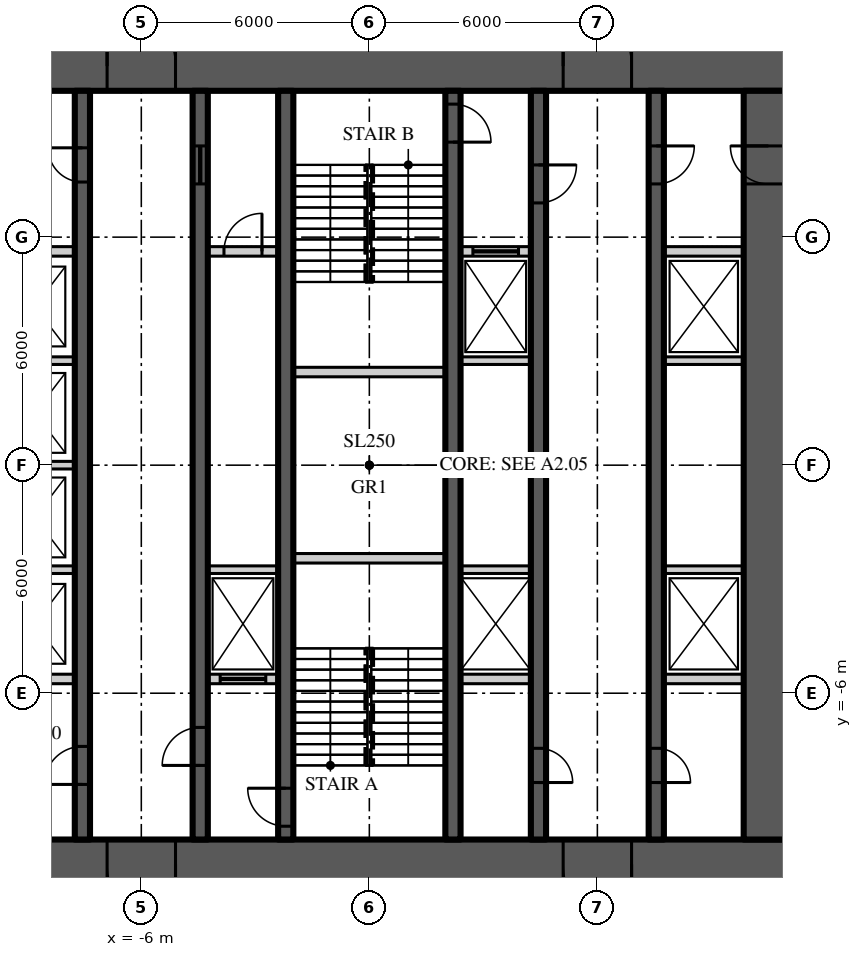
"""IFC4 building model, lengths in metres.
Left out: names, types, materials, properties, quantities, classifications, styles, units other than length and angle.
Written with IfcOpenShell. Run it as: python <this file> out.ifc"""

import sys

from ifc_helpers import new_model, si_unit, direction, frame, frame_2d, origin, place, context, subcontext, project, spatial, rectangle, extrude, element, fill, save


model = new_model("IFC4")
c1 = context("Model", 3, precision=1e-05, world=origin(), true_north=direction((0.0, 1.0)))
c2 = subcontext(c1, "Body", "Model", "MODEL_VIEW")
j1 = project(units=[si_unit("LENGTHUNIT", "METRE"), si_unit("PLANEANGLEUNIT", "RADIAN")], contexts=[c1])
p1 = place(None, origin())
s1 = spatial("IfcSite", under=j1, at=p1, CompositionType="ELEMENT")
p2 = place(p1, origin())
s2 = spatial("IfcBuilding", under=s1, at=p2, CompositionType="ELEMENT")
p3 = place(p2, frame((0.0, 0.0, 15.0)))
s3 = spatial("IfcBuildingStorey", under=s2, at=p3, CompositionType="ELEMENT", Elevation=15.0)
p4 = place(p3, frame((-11.15, 10.5, 0.0), z_axis=(0.0, 0.0, 1.0), x_axis=(1.0, 0.0, 0.0)))
e1 = element("IfcWall", 1, at=p4, inside=s3, PredefinedType="SHEAR", context=c2, shape_type="SweptSolid", body=[
    extrude(rectangle(XDim=22.3, YDim=1.3, at=frame_2d((11.15, 0.0))), origin(), (0.0, 0.0, 1.0), 8.0),
])
p5 = place(p4, frame((4.25, 0.0, 0.0)))
e2 = element("IfcOpeningElement", 2, at=p5, cuts=e1, PredefinedType="OPENING", context=c2, shape_type="SweptSolid", body=[
    extrude(rectangle(XDim=1.8, YDim=2.2, at=frame_2d((0.9, 1.1))), frame((0.0, 0.66, 0.0), z_axis=(0.0, -1.0, 0.0), x_axis=(1.0, 0.0, 0.0)), (0.0, 0.0, 1.0), 1.32),
])
p6 = place(p4, frame((16.25, 0.0, 0.0)))
e3 = element("IfcOpeningElement", 3, at=p6, cuts=e1, PredefinedType="OPENING", context=c2, shape_type="SweptSolid", body=[
    extrude(rectangle(XDim=1.8, YDim=2.2, at=frame_2d((0.9, 1.1))), frame((0.0, 0.66, 0.0), z_axis=(0.0, -1.0, 0.0), x_axis=(1.0, 0.0, 0.0)), (0.0, 0.0, 1.0), 1.32),
])
p7 = place(p3, frame((11.15, -10.5, 0.0), z_axis=(0.0, 0.0, 1.0), x_axis=(-1.0, 0.0, 0.0)))
e4 = element("IfcWall", 4, at=p7, inside=s3, PredefinedType="SHEAR", context=c2, shape_type="SweptSolid", body=[
    extrude(rectangle(XDim=22.3, YDim=1.3, at=frame_2d((11.15, 0.0))), origin(), (0.0, 0.0, 1.0), 8.0),
])
p8 = place(p7, frame((16.25, 0.0, 0.0)))
e5 = element("IfcOpeningElement", 5, at=p8, cuts=e4, PredefinedType="OPENING", context=c2, shape_type="SweptSolid", body=[
    extrude(rectangle(XDim=1.8, YDim=2.2, at=frame_2d((0.9, 1.1))), frame((0.0, 0.66, 0.0), z_axis=(0.0, -1.0, 0.0), x_axis=(1.0, 0.0, 0.0)), (0.0, 0.0, 1.0), 1.32),
])
p9 = place(p7, frame((4.25, 0.0, 0.0)))
e6 = element("IfcOpeningElement", 6, at=p9, cuts=e4, PredefinedType="OPENING", context=c2, shape_type="SweptSolid", body=[
    extrude(rectangle(XDim=1.8, YDim=2.2, at=frame_2d((0.9, 1.1))), frame((0.0, 0.66, 0.0), z_axis=(0.0, -1.0, 0.0), x_axis=(1.0, 0.0, 0.0)), (0.0, 0.0, 1.0), 1.32),
])
p10 = place(p3, frame((10.5, -9.85, 0.0), z_axis=(0.0, 0.0, 1.0), x_axis=(0.0, 1.0, 0.0)))
e7 = element("IfcWall", 7, at=p10, inside=s3, PredefinedType="SHEAR", context=c2, shape_type="SweptSolid", body=[
    extrude(rectangle(XDim=19.7, YDim=1.3, at=frame_2d((9.85, 0.0))), origin(), (0.0, 0.0, 1.0), 8.0),
])
p11 = place(p10, frame((17.25, 0.0, 0.0)))
e8 = element("IfcOpeningElement", 8, at=p11, cuts=e7, PredefinedType="OPENING", context=c2, shape_type="SweptSolid", body=[
    extrude(rectangle(XDim=1.0, YDim=2.2, at=frame_2d((0.5, 1.1))), frame((0.0, 0.66, 0.0), z_axis=(0.0, -1.0, 0.0), x_axis=(1.0, 0.0, 0.0)), (0.0, 0.0, 1.0), 1.32),
])
p12 = place(p3, frame((-7.55, -9.85, 0.0), z_axis=(0.0, 0.0, 1.0), x_axis=(0.0, 1.0, 0.0)))
e9 = element("IfcWall", 9, at=p12, inside=s3, PredefinedType="SHEAR", context=c2, shape_type="SweptSolid", body=[
    extrude(rectangle(XDim=19.7, YDim=0.4, at=frame_2d((9.85, 0.0))), origin(), (0.0, 0.0, 1.0), 8.0),
])
p13 = place(p12, frame((1.45, 0.0, 0.0)))
e10 = element("IfcOpeningElement", 10, at=p13, cuts=e9, PredefinedType="OPENING", context=c2, shape_type="SweptSolid", body=[
    extrude(rectangle(XDim=1.0, YDim=2.2, at=frame_2d((0.5, 1.1))), frame((0.0, 0.21, 0.0), z_axis=(0.0, -1.0, 0.0), x_axis=(1.0, 0.0, 0.0)), (0.0, 0.0, 1.0), 0.42),
])
p14 = place(p12, frame((17.3, 0.0, 0.0)))
e11 = element("IfcOpeningElement", 11, at=p14, cuts=e9, PredefinedType="OPENING", context=c2, shape_type="SweptSolid", body=[
    extrude(rectangle(XDim=0.9, YDim=2.1, at=frame_2d((0.45, 1.05))), frame((0.0, 0.21, 0.0), z_axis=(0.0, -1.0, 0.0), x_axis=(1.0, 0.0, 0.0)), (0.0, 0.0, 1.0), 0.42),
])
p15 = place(p3, frame((7.55, 9.85, 0.0), z_axis=(0.0, 0.0, 1.0), x_axis=(0.0, -1.0, 0.0)))
e12 = element("IfcWall", 12, at=p15, inside=s3, PredefinedType="SHEAR", context=c2, shape_type="SweptSolid", body=[
    extrude(rectangle(XDim=19.7, YDim=0.4, at=frame_2d((9.85, 0.0))), origin(), (0.0, 0.0, 1.0), 8.0),
])
p16 = place(p15, frame((1.45, 0.0, 0.0)))
e13 = element("IfcOpeningElement", 13, at=p16, cuts=e12, PredefinedType="OPENING", context=c2, shape_type="SweptSolid", body=[
    extrude(rectangle(XDim=1.0, YDim=2.2, at=frame_2d((0.5, 1.1))), frame((0.0, 0.21, 0.0), z_axis=(0.0, -1.0, 0.0), x_axis=(1.0, 0.0, 0.0)), (0.0, 0.0, 1.0), 0.42),
])
p17 = place(p15, frame((17.3, 0.0, 0.0)))
e14 = element("IfcOpeningElement", 14, at=p17, cuts=e12, PredefinedType="OPENING", context=c2, shape_type="SweptSolid", body=[
    extrude(rectangle(XDim=0.9, YDim=2.1, at=frame_2d((0.45, 1.05))), frame((0.0, 0.21, 0.0), z_axis=(0.0, -1.0, 0.0), x_axis=(1.0, 0.0, 0.0)), (0.0, 0.0, 1.0), 0.42),
])
p18 = place(p3, frame((-4.45, -9.85, 0.0), z_axis=(0.0, 0.0, 1.0), x_axis=(0.0, 1.0, 0.0)))
e15 = element("IfcWall", 15, at=p18, inside=s3, PredefinedType="SHEAR", context=c2, shape_type="SweptSolid", body=[
    extrude(rectangle(XDim=19.7, YDim=0.4, at=frame_2d((9.85, 0.0))), origin(), (0.0, 0.0, 1.0), 8.0),
])
p19 = place(p18, frame((1.95, 0.0, 0.0)))
e16 = element("IfcOpeningElement", 16, at=p19, cuts=e15, PredefinedType="OPENING", context=c2, shape_type="SweptSolid", body=[
    extrude(rectangle(XDim=1.0, YDim=2.2, at=frame_2d((0.5, 1.1))), frame((0.0, 0.21, 0.0), z_axis=(0.0, -1.0, 0.0), x_axis=(1.0, 0.0, 0.0)), (0.0, 0.0, 1.0), 0.42),
])
p20 = place(p18, frame((17.25, 0.0, 0.0)))
e17 = element("IfcOpeningElement", 17, at=p20, cuts=e15, PredefinedType="OPENING", context=c2, shape_type="SweptSolid", body=[
    extrude(rectangle(XDim=1.0, YDim=2.1, at=frame_2d((0.5, 1.05))), frame((0.0, 0.21, 0.0), z_axis=(0.0, -1.0, 0.0), x_axis=(1.0, 0.0, 0.0)), (0.0, 0.0, 1.0), 0.42),
])
p21 = place(p3, frame((4.45, 9.85, 0.0), z_axis=(0.0, 0.0, 1.0), x_axis=(0.0, -1.0, 0.0)))
e18 = element("IfcWall", 18, at=p21, inside=s3, PredefinedType="SHEAR", context=c2, shape_type="SweptSolid", body=[
    extrude(rectangle(XDim=19.7, YDim=0.4, at=frame_2d((9.85, 0.0))), origin(), (0.0, 0.0, 1.0), 8.0),
])
p22 = place(p21, frame((1.95, 0.0, 0.0)))
e19 = element("IfcOpeningElement", 19, at=p22, cuts=e18, PredefinedType="OPENING", context=c2, shape_type="SweptSolid", body=[
    extrude(rectangle(XDim=1.0, YDim=2.2, at=frame_2d((0.5, 1.1))), frame((0.0, 0.21, 0.0), z_axis=(0.0, -1.0, 0.0), x_axis=(1.0, 0.0, 0.0)), (0.0, 0.0, 1.0), 0.42),
])
p23 = place(p21, frame((17.3, 0.0, 0.0)))
e20 = element("IfcOpeningElement", 20, at=p23, cuts=e18, PredefinedType="OPENING", context=c2, shape_type="SweptSolid", body=[
    extrude(rectangle(XDim=0.9, YDim=2.1, at=frame_2d((0.45, 1.05))), frame((0.0, 0.21, 0.0), z_axis=(0.0, -1.0, 0.0), x_axis=(1.0, 0.0, 0.0)), (0.0, 0.0, 1.0), 0.42),
])
p24 = place(p3, frame((-2.2, -9.85, 0.0), z_axis=(0.0, 0.0, 1.0), x_axis=(0.0, 1.0, 0.0)))
e21 = element("IfcWall", 21, at=p24, inside=s3, PredefinedType="SHEAR", context=c2, shape_type="SweptSolid", body=[
    extrude(rectangle(XDim=19.7, YDim=0.4, at=frame_2d((9.85, 0.0))), origin(), (0.0, 0.0, 1.0), 8.0),
])
p25 = place(p24, frame((0.35, 0.0, 0.0)))
e22 = element("IfcOpeningElement", 22, at=p25, cuts=e21, PredefinedType="OPENING", context=c2, shape_type="SweptSolid", body=[
    extrude(rectangle(XDim=1.0, YDim=2.2, at=frame_2d((0.5, 1.1))), frame((0.0, 0.21, 0.0), z_axis=(0.0, -1.0, 0.0), x_axis=(1.0, 0.0, 0.0)), (0.0, 0.0, 1.0), 0.42),
])
p26 = place(p3, frame((2.2, 9.85, 0.0), z_axis=(0.0, 0.0, 1.0), x_axis=(0.0, -1.0, 0.0)))
e23 = element("IfcWall", 23, at=p26, inside=s3, PredefinedType="SHEAR", context=c2, shape_type="SweptSolid", body=[
    extrude(rectangle(XDim=19.7, YDim=0.4, at=frame_2d((9.85, 0.0))), origin(), (0.0, 0.0, 1.0), 8.0),
])
p27 = place(p26, frame((0.35, 0.0, 0.0)))
e24 = element("IfcOpeningElement", 24, at=p27, cuts=e23, PredefinedType="OPENING", context=c2, shape_type="SweptSolid", body=[
    extrude(rectangle(XDim=1.0, YDim=2.2, at=frame_2d((0.5, 1.1))), frame((0.0, 0.21, 0.0), z_axis=(0.0, -1.0, 0.0), x_axis=(1.0, 0.0, 0.0)), (0.0, 0.0, 1.0), 0.42),
])
p28 = place(p3, frame((-9.85, 5.625, 0.0), z_axis=(0.0, 0.0, 1.0), x_axis=(1.0, 0.0, 0.0)))
e25 = element("IfcWall", 25, at=p28, inside=s3, PredefinedType="SOLIDWALL", context=c2, shape_type="SweptSolid", body=[
    extrude(rectangle(XDim=2.1, YDim=0.25, at=frame_2d((1.05, 0.0))), origin(), (0.0, 0.0, 1.0), 7.8),
])
p29 = place(p3, frame((-4.25, 5.625, 0.0), z_axis=(0.0, 0.0, 1.0), x_axis=(1.0, 0.0, 0.0)))
e26 = element("IfcWall", 26, at=p29, inside=s3, PredefinedType="SOLIDWALL", context=c2, shape_type="SweptSolid", body=[
    extrude(rectangle(XDim=1.85, YDim=0.25, at=frame_2d((0.925, 0.0))), origin(), (0.0, 0.0, 1.0), 7.8),
])
p30 = place(p29, frame((0.425, 0.0, 0.0)))
e27 = element("IfcOpeningElement", 27, at=p30, cuts=e26, PredefinedType="OPENING", context=c2, shape_type="SweptSolid", body=[
    extrude(rectangle(XDim=1.0, YDim=2.2, at=frame_2d((0.5, 1.1))), frame((0.0, 0.135, 0.0), z_axis=(0.0, -1.0, 0.0), x_axis=(1.0, 0.0, 0.0)), (0.0, 0.0, 1.0), 0.27),
])
p31 = place(p3, frame((2.4, 5.625, 0.0), z_axis=(0.0, 0.0, 1.0), x_axis=(1.0, 0.0, 0.0)))
e28 = element("IfcWall", 28, at=p31, inside=s3, PredefinedType="SOLIDWALL", context=c2, shape_type="SweptSolid", body=[
    extrude(rectangle(XDim=1.85, YDim=0.25, at=frame_2d((0.925, 0.0))), origin(), (0.0, 0.0, 1.0), 7.8),
])
p32 = place(p31, frame((0.325, 0.0, 0.0)))
e29 = element("IfcOpeningElement", 29, at=p32, cuts=e28, PredefinedType="OPENING", context=c2, shape_type="SweptSolid", body=[
    extrude(rectangle(XDim=1.2, YDim=2.2, at=frame_2d((0.6, 1.1))), frame((0.0, 0.135, 0.0), z_axis=(0.0, -1.0, 0.0), x_axis=(1.0, 0.0, 0.0)), (0.0, 0.0, 1.0), 0.27),
])
for number, where, z_axis, x_axis in (
    (30, (7.75, 5.625, 0.0), (0.0, 0.0, 1.0), (1.0, 0.0, 0.0)),
    (31, (-9.85, -5.625, 0.0), (0.0, 0.0, 1.0), (1.0, 0.0, 0.0)),
):
    element("IfcWall", number, at=place(p3, frame(where, z_axis=z_axis, x_axis=x_axis)), inside=s3, PredefinedType="SOLIDWALL", context=c2, shape_type="SweptSolid", body=[
        extrude(rectangle(XDim=2.1, YDim=0.25, at=frame_2d((1.05, 0.0))), origin(), (0.0, 0.0, 1.0), 7.8),
    ])
p33 = place(p3, frame((-4.25, -5.625, 0.0), z_axis=(0.0, 0.0, 1.0), x_axis=(1.0, 0.0, 0.0)))
e32 = element("IfcWall", 32, at=p33, inside=s3, PredefinedType="SOLIDWALL", context=c2, shape_type="SweptSolid", body=[
    extrude(rectangle(XDim=1.85, YDim=0.25, at=frame_2d((0.925, 0.0))), origin(), (0.0, 0.0, 1.0), 7.8),
])
p34 = place(p33, frame((0.325, 0.0, 0.0)))
e33 = element("IfcOpeningElement", 33, at=p34, cuts=e32, PredefinedType="OPENING", context=c2, shape_type="SweptSolid", body=[
    extrude(rectangle(XDim=1.2, YDim=2.2, at=frame_2d((0.6, 1.1))), frame((0.0, 0.135, 0.0), z_axis=(0.0, -1.0, 0.0), x_axis=(1.0, 0.0, 0.0)), (0.0, 0.0, 1.0), 0.27),
])
p35 = place(p3, frame((2.4, -5.625, 0.0), z_axis=(0.0, 0.0, 1.0), x_axis=(1.0, 0.0, 0.0)))
e34 = element("IfcWall", 34, at=p35, inside=s3, PredefinedType="SOLIDWALL", context=c2, shape_type="SweptSolid", body=[
    extrude(rectangle(XDim=1.85, YDim=0.25, at=frame_2d((0.925, 0.0))), origin(), (0.0, 0.0, 1.0), 7.8),
])
p36 = place(p3, frame((7.75, -5.625, 0.0), z_axis=(0.0, 0.0, 1.0), x_axis=(1.0, 0.0, 0.0)))
e35 = element("IfcWall", 35, at=p36, inside=s3, PredefinedType="SOLIDWALL", context=c2, shape_type="SweptSolid", body=[
    extrude(rectangle(XDim=2.1, YDim=0.25, at=frame_2d((1.05, 0.0))), origin(), (0.0, 0.0, 1.0), 7.8),
])
for number, where, z_axis, x_axis in (
    (36, (-2.0, -2.45, 0.0), (0.0, 0.0, 1.0), (1.0, 0.0, 0.0)),
    (37, (-2.0, 2.45, 0.0), (0.0, 0.0, 1.0), (1.0, 0.0, 0.0)),
):
    element("IfcWall", number, at=place(p3, frame(where, z_axis=z_axis, x_axis=x_axis)), inside=s3, PredefinedType="SOLIDWALL", context=c2, shape_type="SweptSolid", body=[
        extrude(rectangle(XDim=4.0, YDim=0.25, at=frame_2d((2.0, 0.0))), origin(), (0.0, 0.0, 1.0), 7.8),
    ])
p37 = place(p3, frame((-9.85, -2.75, 0.0), z_axis=(0.0, 0.0, 1.0), x_axis=(1.0, 0.0, 0.0)))
e38 = element("IfcWall", 38, at=p37, inside=s3, PredefinedType="SOLIDWALL", context=c2, shape_type="SweptSolid", body=[
    extrude(rectangle(XDim=2.1, YDim=0.2, at=frame_2d((1.05, 0.0))), origin(), (0.0, 0.0, 1.0), 7.8),
])
for number, where, z_axis, x_axis in (
    (39, (-4.25, -2.75, 0.0), (0.0, 0.0, 1.0), (1.0, 0.0, 0.0)),
    (40, (2.4, -2.75, 0.0), (0.0, 0.0, 1.0), (1.0, 0.0, 0.0)),
):
    element("IfcWall", number, at=place(p3, frame(where, z_axis=z_axis, x_axis=x_axis)), inside=s3, PredefinedType="SOLIDWALL", context=c2, shape_type="SweptSolid", body=[
        extrude(rectangle(XDim=1.85, YDim=0.2, at=frame_2d((0.925, 0.0))), origin(), (0.0, 0.0, 1.0), 7.8),
    ])
for number, where, z_axis, x_axis in (
    (41, (7.75, -2.75, 0.0), (0.0, 0.0, 1.0), (1.0, 0.0, 0.0)),
    (42, (-9.85, 0.0, 0.0), (0.0, 0.0, 1.0), (1.0, 0.0, 0.0)),
    (43, (-9.85, 2.75, 0.0), (0.0, 0.0, 1.0), (1.0, 0.0, 0.0)),
):
    element("IfcWall", number, at=place(p3, frame(where, z_axis=z_axis, x_axis=x_axis)), inside=s3, PredefinedType="SOLIDWALL", context=c2, shape_type="SweptSolid", body=[
        extrude(rectangle(XDim=2.1, YDim=0.2, at=frame_2d((1.05, 0.0))), origin(), (0.0, 0.0, 1.0), 7.8),
    ])
p38 = place(p3, frame((2.4, 2.75, 0.0), z_axis=(0.0, 0.0, 1.0), x_axis=(1.0, 0.0, 0.0)))
e44 = element("IfcWall", 44, at=p38, inside=s3, PredefinedType="SOLIDWALL", context=c2, shape_type="SweptSolid", body=[
    extrude(rectangle(XDim=1.85, YDim=0.2, at=frame_2d((0.925, 0.0))), origin(), (0.0, 0.0, 1.0), 7.8),
])
p39 = place(p3, frame((7.75, 2.75, 0.0), z_axis=(0.0, 0.0, 1.0), x_axis=(1.0, 0.0, 0.0)))
e45 = element("IfcWall", 45, at=p39, inside=s3, PredefinedType="SOLIDWALL", context=c2, shape_type="SweptSolid", body=[
    extrude(rectangle(XDim=2.1, YDim=0.2, at=frame_2d((1.05, 0.0))), origin(), (0.0, 0.0, 1.0), 7.8),
])
p40 = place(p5, origin())
e46 = element("IfcDoor", 46, at=p40, inside=s3, OperationType="DOUBLE_DOOR_DOUBLE_SWING", PredefinedType="DOOR", context=c2, shape_type="SweptSolid", body=[
    extrude(rectangle(XDim=1.8, YDim=2.2, at=frame_2d((0.9, 1.1))), frame((0.0, 0.025, 0.0), z_axis=(0.0, -1.0, 0.0), x_axis=(1.0, 0.0, 0.0)), (0.0, 0.0, 1.0), 0.05),
])
fill(e2, e46)
p41 = place(p8, origin())
e47 = element("IfcDoor", 47, at=p41, inside=s3, OperationType="DOUBLE_DOOR_DOUBLE_SWING", PredefinedType="DOOR", context=c2, shape_type="SweptSolid", body=[
    extrude(rectangle(XDim=1.8, YDim=2.2, at=frame_2d((0.9, 1.1))), frame((0.0, 0.025, 0.0), z_axis=(0.0, -1.0, 0.0), x_axis=(1.0, 0.0, 0.0)), (0.0, 0.0, 1.0), 0.05),
])
fill(e5, e47)
p42 = place(p6, origin())
e48 = element("IfcDoor", 48, at=p42, inside=s3, OperationType="DOUBLE_DOOR_DOUBLE_SWING", PredefinedType="DOOR", context=c2, shape_type="SweptSolid", body=[
    extrude(rectangle(XDim=1.8, YDim=2.2, at=frame_2d((0.9, 1.1))), frame((0.0, 0.025, 0.0), z_axis=(0.0, -1.0, 0.0), x_axis=(1.0, 0.0, 0.0)), (0.0, 0.0, 1.0), 0.05),
])
fill(e3, e48)
p43 = place(p9, origin())
e49 = element("IfcDoor", 49, at=p43, inside=s3, OperationType="DOUBLE_DOOR_DOUBLE_SWING", PredefinedType="DOOR", context=c2, shape_type="SweptSolid", body=[
    extrude(rectangle(XDim=1.8, YDim=2.2, at=frame_2d((0.9, 1.1))), frame((0.0, 0.025, 0.0), z_axis=(0.0, -1.0, 0.0), x_axis=(1.0, 0.0, 0.0)), (0.0, 0.0, 1.0), 0.05),
])
fill(e6, e49)
p44 = place(p13, origin())
e50 = element("IfcDoor", 50, at=p44, inside=s3, OperationType="SINGLE_SWING_LEFT", PredefinedType="DOOR", context=c2, shape_type="SweptSolid", body=[
    extrude(rectangle(XDim=1.0, YDim=2.2, at=frame_2d((0.5, 1.1))), frame((0.0, 0.025, 0.0), z_axis=(0.0, -1.0, 0.0), x_axis=(1.0, 0.0, 0.0)), (0.0, 0.0, 1.0), 0.05),
])
fill(e10, e50)
p45 = place(p16, origin())
e51 = element("IfcDoor", 51, at=p45, inside=s3, OperationType="SINGLE_SWING_LEFT", PredefinedType="DOOR", context=c2, shape_type="SweptSolid", body=[
    extrude(rectangle(XDim=1.0, YDim=2.2, at=frame_2d((0.5, 1.1))), frame((0.0, 0.025, 0.0), z_axis=(0.0, -1.0, 0.0), x_axis=(1.0, 0.0, 0.0)), (0.0, 0.0, 1.0), 0.05),
])
fill(e13, e51)
p46 = place(p11, origin())
e52 = element("IfcDoor", 52, at=p46, inside=s3, OperationType="SINGLE_SWING_RIGHT", PredefinedType="DOOR", context=c2, shape_type="SweptSolid", body=[
    extrude(rectangle(XDim=1.0, YDim=2.2, at=frame_2d((0.5, 1.1))), frame((0.0, 0.025, 0.0), z_axis=(0.0, -1.0, 0.0), x_axis=(1.0, 0.0, 0.0)), (0.0, 0.0, 1.0), 0.05),
])
fill(e8, e52)
p47 = place(p19, origin())
e53 = element("IfcDoor", 53, at=p47, inside=s3, OperationType="SINGLE_SWING_LEFT", PredefinedType="DOOR", context=c2, shape_type="SweptSolid", body=[
    extrude(rectangle(XDim=1.0, YDim=2.2, at=frame_2d((0.5, 1.1))), frame((0.0, 0.025, 0.0), z_axis=(0.0, -1.0, 0.0), x_axis=(1.0, 0.0, 0.0)), (0.0, 0.0, 1.0), 0.05),
])
fill(e16, e53)
p48 = place(p25, origin())
e54 = element("IfcDoor", 54, at=p48, inside=s3, OperationType="SINGLE_SWING_RIGHT", PredefinedType="DOOR", context=c2, shape_type="SweptSolid", body=[
    extrude(rectangle(XDim=1.0, YDim=2.2, at=frame_2d((0.5, 1.1))), frame((0.0, 0.025, 0.0), z_axis=(0.0, -1.0, 0.0), x_axis=(1.0, 0.0, 0.0)), (0.0, 0.0, 1.0), 0.05),
])
fill(e22, e54)
p49 = place(p22, origin())
e55 = element("IfcDoor", 55, at=p49, inside=s3, OperationType="SINGLE_SWING_LEFT", PredefinedType="DOOR", context=c2, shape_type="SweptSolid", body=[
    extrude(rectangle(XDim=1.0, YDim=2.2, at=frame_2d((0.5, 1.1))), frame((0.0, 0.025, 0.0), z_axis=(0.0, -1.0, 0.0), x_axis=(1.0, 0.0, 0.0)), (0.0, 0.0, 1.0), 0.05),
])
fill(e19, e55)
p50 = place(p27, origin())
e56 = element("IfcDoor", 56, at=p50, inside=s3, OperationType="SINGLE_SWING_RIGHT", PredefinedType="DOOR", context=c2, shape_type="SweptSolid", body=[
    extrude(rectangle(XDim=1.0, YDim=2.2, at=frame_2d((0.5, 1.1))), frame((0.0, 0.025, 0.0), z_axis=(0.0, -1.0, 0.0), x_axis=(1.0, 0.0, 0.0)), (0.0, 0.0, 1.0), 0.05),
])
fill(e24, e56)
p51 = place(p14, origin())
e57 = element("IfcDoor", 57, at=p51, inside=s3, OperationType="SINGLE_SWING_RIGHT", PredefinedType="DOOR", context=c2, shape_type="SweptSolid", body=[
    extrude(rectangle(XDim=0.9, YDim=2.1, at=frame_2d((0.45, 1.05))), frame((0.0, 0.025, 0.0), z_axis=(0.0, -1.0, 0.0), x_axis=(1.0, 0.0, 0.0)), (0.0, 0.0, 1.0), 0.05),
])
fill(e11, e57)
p52 = place(p20, origin())
e58 = element("IfcDoor", 58, at=p52, inside=s3, OperationType="SLIDING_TO_LEFT", PredefinedType="DOOR", context=c2, shape_type="SweptSolid", body=[
    extrude(rectangle(XDim=1.0, YDim=2.1, at=frame_2d((0.5, 1.05))), frame((0.0, 0.025, 0.0), z_axis=(0.0, -1.0, 0.0), x_axis=(1.0, 0.0, 0.0)), (0.0, 0.0, 1.0), 0.05),
])
fill(e17, e58)
p53 = place(p17, origin())
e59 = element("IfcDoor", 59, at=p53, inside=s3, OperationType="SINGLE_SWING_RIGHT", PredefinedType="DOOR", context=c2, shape_type="SweptSolid", body=[
    extrude(rectangle(XDim=0.9, YDim=2.1, at=frame_2d((0.45, 1.05))), frame((0.0, 0.025, 0.0), z_axis=(0.0, -1.0, 0.0), x_axis=(1.0, 0.0, 0.0)), (0.0, 0.0, 1.0), 0.05),
])
fill(e14, e59)
p54 = place(p23, origin())
e60 = element("IfcDoor", 60, at=p54, inside=s3, OperationType="SINGLE_SWING_RIGHT", PredefinedType="DOOR", context=c2, shape_type="SweptSolid", body=[
    extrude(rectangle(XDim=0.9, YDim=2.1, at=frame_2d((0.45, 1.05))), frame((0.0, 0.025, 0.0), z_axis=(0.0, -1.0, 0.0), x_axis=(1.0, 0.0, 0.0)), (0.0, 0.0, 1.0), 0.05),
])
fill(e20, e60)
p55 = place(p34, origin())
e61 = element("IfcDoor", 61, at=p55, inside=s3, OperationType="SLIDING_TO_LEFT", PredefinedType="DOOR", context=c2, shape_type="SweptSolid", body=[
    extrude(rectangle(XDim=1.2, YDim=2.2, at=frame_2d((0.6, 1.1))), frame((0.0, 0.025, 0.0), z_axis=(0.0, -1.0, 0.0), x_axis=(1.0, 0.0, 0.0)), (0.0, 0.0, 1.0), 0.05),
])
fill(e33, e61)
p56 = place(p32, origin())
e62 = element("IfcDoor", 62, at=p56, inside=s3, OperationType="SLIDING_TO_LEFT", PredefinedType="DOOR", context=c2, shape_type="SweptSolid", body=[
    extrude(rectangle(XDim=1.2, YDim=2.2, at=frame_2d((0.6, 1.1))), frame((0.0, 0.025, 0.0), z_axis=(0.0, -1.0, 0.0), x_axis=(1.0, 0.0, 0.0)), (0.0, 0.0, 1.0), 0.05),
])
fill(e29, e62)
p57 = place(p30, origin())
e63 = element("IfcDoor", 63, at=p57, inside=s3, OperationType="SINGLE_SWING_RIGHT", PredefinedType="DOOR", context=c2, shape_type="SweptSolid", body=[
    extrude(rectangle(XDim=1.0, YDim=2.2, at=frame_2d((0.5, 1.1))), frame((0.0, 0.025, 0.0), z_axis=(0.0, -1.0, 0.0), x_axis=(1.0, 0.0, 0.0)), (0.0, 0.0, 1.0), 0.05),
])
fill(e27, e63)
save(model, sys.argv[1])
